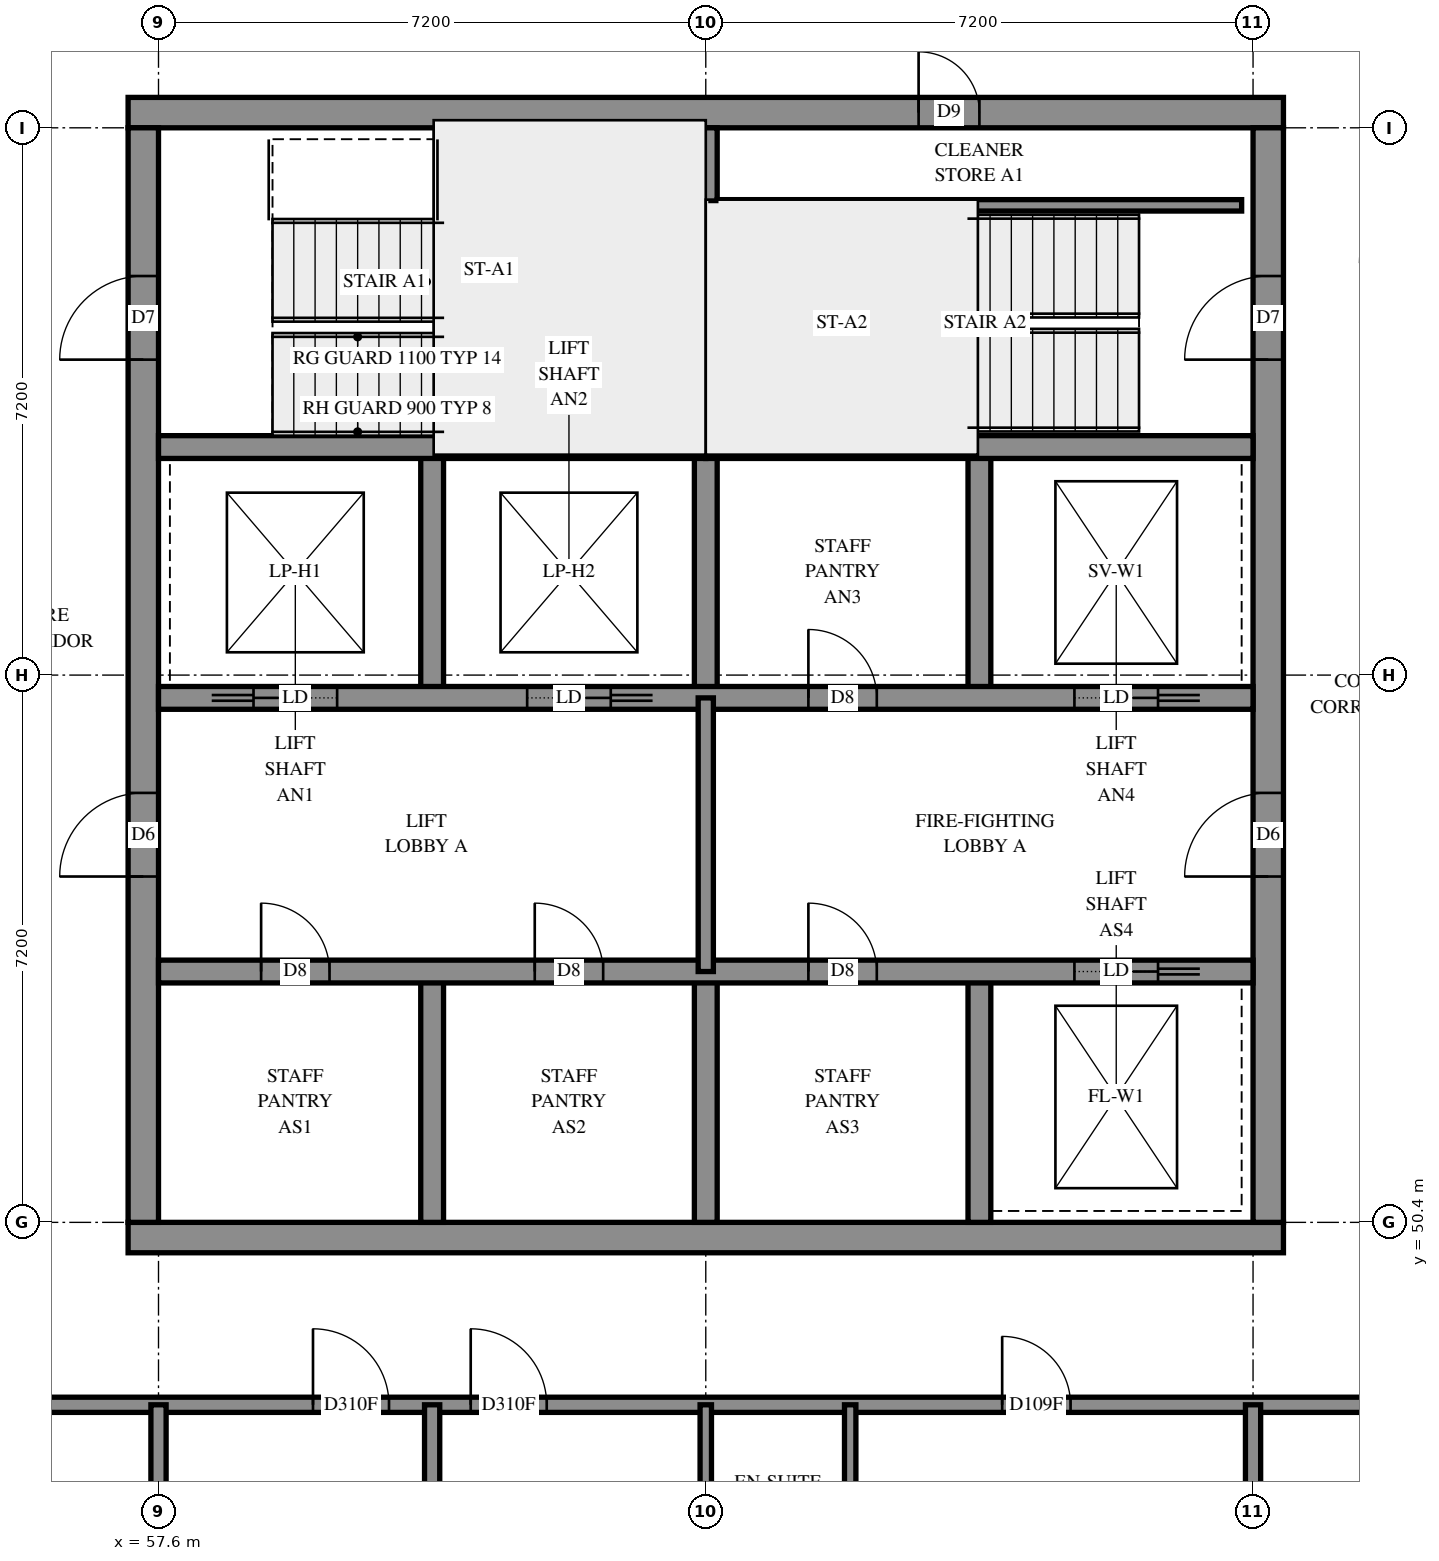
"""IFC4 building model, lengths in metres.
Left out: names, types, materials, properties, quantities, classifications, styles, units other than length and angle.
Written with IfcOpenShell. Run it as: python <this file> out.ifc"""

import sys

from ifc_helpers import new_model, si_unit, direction, frame, frame_2d, origin, place, context, subcontext, project, spatial, rectangle, extrude, element, fill, save


model = new_model("IFC4")
c1 = context("Model", 3, precision=1e-05, world=origin(), true_north=direction((0.0, 1.0)))
c2 = subcontext(c1, "Body", "Model", "MODEL_VIEW")
j1 = project(units=[si_unit("LENGTHUNIT", "METRE"), si_unit("PLANEANGLEUNIT", "RADIAN")], contexts=[c1])
p1 = place(None, origin())
s1 = spatial("IfcSite", under=j1, at=p1, CompositionType="ELEMENT")
p2 = place(p1, origin())
s2 = spatial("IfcBuilding", under=s1, at=p2, CompositionType="ELEMENT")
p3 = place(p2, frame((0.0, 0.0, 271.0)))
s3 = spatial("IfcBuildingStorey", under=s2, at=p3, CompositionType="ELEMENT", Elevation=271.0)
p4 = place(p3, frame((57.2, 50.2, -0.3), z_axis=(0.0, 0.0, 1.0), x_axis=(1.0, 0.0, 0.0)))
e1 = element("IfcWall", 1, at=p4, inside=s3, PredefinedType="SHEAR", context=c2, shape_type="SweptSolid", body=[
    extrude(rectangle(XDim=15.2, YDim=0.4, at=frame_2d((7.6, 0.0))), origin(), (0.0, 0.0, 1.0), 2.7),
])
p5 = place(p3, frame((57.2, 65.0, -0.3), z_axis=(0.0, 0.0, 1.0), x_axis=(1.0, 0.0, 0.0)))
e2 = element("IfcWall", 2, at=p5, inside=s3, PredefinedType="SHEAR", context=c2, shape_type="SweptSolid", body=[
    extrude(rectangle(XDim=15.2, YDim=0.4, at=frame_2d((7.6, 0.0))), origin(), (0.0, 0.0, 1.0), 2.7),
])
p6 = place(p5, frame((10.4, 0.0, 0.3)))
e3 = element("IfcOpeningElement", 3, at=p6, cuts=e2, PredefinedType="OPENING", context=c2, shape_type="SweptSolid", body=[
    extrude(rectangle(XDim=0.8, YDim=2.1, at=frame_2d((0.4, 1.05))), frame((0.0, 0.21, 0.0), z_axis=(0.0, -1.0, 0.0), x_axis=(1.0, 0.0, 0.0)), (0.0, 0.0, 1.0), 0.42),
])
p7 = place(p3, frame((57.4, 50.4, -0.3), z_axis=(0.0, 0.0, 1.0), x_axis=(0.0, 1.0, 0.0)))
e4 = element("IfcWall", 4, at=p7, inside=s3, PredefinedType="SHEAR", context=c2, shape_type="SweptSolid", body=[
    extrude(rectangle(XDim=14.4, YDim=0.4, at=frame_2d((7.2, 0.0))), origin(), (0.0, 0.0, 1.0), 2.7),
])
p8 = place(p7, frame((4.55, 0.0, 0.3)))
e5 = element("IfcOpeningElement", 5, at=p8, cuts=e4, PredefinedType="OPENING", context=c2, shape_type="SweptSolid", body=[
    extrude(rectangle(XDim=1.1, YDim=2.1, at=frame_2d((0.55, 1.05))), frame((0.0, 0.21, 0.0), z_axis=(0.0, -1.0, 0.0), x_axis=(1.0, 0.0, 0.0)), (0.0, 0.0, 1.0), 0.42),
])
p9 = place(p7, frame((11.35, 0.0, 0.3)))
e6 = element("IfcOpeningElement", 6, at=p9, cuts=e4, PredefinedType="OPENING", context=c2, shape_type="SweptSolid", body=[
    extrude(rectangle(XDim=1.1, YDim=2.1, at=frame_2d((0.55, 1.05))), frame((0.0, 0.21, 0.0), z_axis=(0.0, -1.0, 0.0), x_axis=(1.0, 0.0, 0.0)), (0.0, 0.0, 1.0), 0.42),
])
p10 = place(p3, frame((72.2, 50.4, -0.3), z_axis=(0.0, 0.0, 1.0), x_axis=(0.0, 1.0, 0.0)))
e7 = element("IfcWall", 7, at=p10, inside=s3, PredefinedType="SHEAR", context=c2, shape_type="SweptSolid", body=[
    extrude(rectangle(XDim=14.4, YDim=0.4, at=frame_2d((7.2, 0.0))), origin(), (0.0, 0.0, 1.0), 2.7),
])
p11 = place(p10, frame((4.55, 0.0, 0.3)))
e8 = element("IfcOpeningElement", 8, at=p11, cuts=e7, PredefinedType="OPENING", context=c2, shape_type="SweptSolid", body=[
    extrude(rectangle(XDim=1.1, YDim=2.1, at=frame_2d((0.55, 1.05))), frame((0.0, 0.21, 0.0), z_axis=(0.0, -1.0, 0.0), x_axis=(1.0, 0.0, 0.0)), (0.0, 0.0, 1.0), 0.42),
])
p12 = place(p10, frame((11.35, 0.0, 0.3)))
e9 = element("IfcOpeningElement", 9, at=p12, cuts=e7, PredefinedType="OPENING", context=c2, shape_type="SweptSolid", body=[
    extrude(rectangle(XDim=1.1, YDim=2.1, at=frame_2d((0.55, 1.05))), frame((0.0, 0.21, 0.0), z_axis=(0.0, -1.0, 0.0), x_axis=(1.0, 0.0, 0.0)), (0.0, 0.0, 1.0), 0.42),
])
for number, where, z_axis, x_axis in (
    (10, (61.2, 50.4, 0.0), (0.0, 0.0, 1.0), (0.0, 1.0, 0.0)),
    (11, (61.2, 57.3, 0.0), (0.0, 0.0, 1.0), (0.0, 1.0, 0.0)),
    (12, (64.8, 50.4, 0.0), (0.0, 0.0, 1.0), (0.0, 1.0, 0.0)),
    (13, (64.8, 57.3, 0.0), (0.0, 0.0, 1.0), (0.0, 1.0, 0.0)),
    (14, (68.4, 50.4, 0.0), (0.0, 0.0, 1.0), (0.0, 1.0, 0.0)),
    (15, (68.4, 57.3, 0.0), (0.0, 0.0, 1.0), (0.0, 1.0, 0.0)),
):
    element("IfcWall", number, at=place(p3, frame(where, z_axis=z_axis, x_axis=x_axis)), inside=s3, PredefinedType="SOLIDWALL", context=c2, shape_type="SweptSolid", body=[
        extrude(rectangle(XDim=3.3, YDim=0.3, at=frame_2d((1.65, 0.0))), origin(), (0.0, 0.0, 1.0), 3.1),
    ])
p13 = place(p3, frame((57.6, 53.7, 0.0), z_axis=(0.0, 0.0, 1.0), x_axis=(1.0, 0.0, 0.0)))
e16 = element("IfcWall", 16, at=p13, inside=s3, PredefinedType="SOLIDWALL", context=c2, shape_type="SweptSolid", body=[
    extrude(rectangle(XDim=14.4, YDim=0.3, at=frame_2d((7.2, 0.0))), origin(), (0.0, 0.0, 1.0), 3.1),
])
p14 = place(p13, frame((1.35, 0.0, 0.0)))
e17 = element("IfcOpeningElement", 17, at=p14, cuts=e16, PredefinedType="OPENING", context=c2, shape_type="SweptSolid", body=[
    extrude(rectangle(XDim=0.9, YDim=2.1, at=frame_2d((0.45, 1.05))), frame((0.0, 0.16, 0.0), z_axis=(0.0, -1.0, 0.0), x_axis=(1.0, 0.0, 0.0)), (0.0, 0.0, 1.0), 0.32),
])
p15 = place(p13, frame((4.95, 0.0, 0.0)))
e18 = element("IfcOpeningElement", 18, at=p15, cuts=e16, PredefinedType="OPENING", context=c2, shape_type="SweptSolid", body=[
    extrude(rectangle(XDim=0.9, YDim=2.1, at=frame_2d((0.45, 1.05))), frame((0.0, 0.16, 0.0), z_axis=(0.0, -1.0, 0.0), x_axis=(1.0, 0.0, 0.0)), (0.0, 0.0, 1.0), 0.32),
])
p16 = place(p13, frame((8.55, 0.0, 0.0)))
e19 = element("IfcOpeningElement", 19, at=p16, cuts=e16, PredefinedType="OPENING", context=c2, shape_type="SweptSolid", body=[
    extrude(rectangle(XDim=0.9, YDim=2.1, at=frame_2d((0.45, 1.05))), frame((0.0, 0.16, 0.0), z_axis=(0.0, -1.0, 0.0), x_axis=(1.0, 0.0, 0.0)), (0.0, 0.0, 1.0), 0.32),
])
p17 = place(p13, frame((12.05, 0.0, 0.0)))
e20 = element("IfcOpeningElement", 20, at=p17, cuts=e16, PredefinedType="OPENING", context=c2, shape_type="SweptSolid", body=[
    extrude(rectangle(XDim=1.1, YDim=2.1, at=frame_2d((0.55, 1.05))), frame((0.0, 0.16, 0.0), z_axis=(0.0, -1.0, 0.0), x_axis=(1.0, 0.0, 0.0)), (0.0, 0.0, 1.0), 0.32),
])
p18 = place(p3, frame((57.6, 57.3, 0.0), z_axis=(0.0, 0.0, 1.0), x_axis=(1.0, 0.0, 0.0)))
e21 = element("IfcWall", 21, at=p18, inside=s3, PredefinedType="SOLIDWALL", context=c2, shape_type="SweptSolid", body=[
    extrude(rectangle(XDim=14.4, YDim=0.3, at=frame_2d((7.2, 0.0))), origin(), (0.0, 0.0, 1.0), 3.1),
])
p19 = place(p18, frame((8.55, 0.0, 0.0)))
e22 = element("IfcOpeningElement", 22, at=p19, cuts=e21, PredefinedType="OPENING", context=c2, shape_type="SweptSolid", body=[
    extrude(rectangle(XDim=0.9, YDim=2.1, at=frame_2d((0.45, 1.05))), frame((0.0, 0.16, 0.0), z_axis=(0.0, -1.0, 0.0), x_axis=(1.0, 0.0, 0.0)), (0.0, 0.0, 1.0), 0.32),
])
p20 = place(p18, frame((1.25, 0.0, 0.0)))
e23 = element("IfcOpeningElement", 23, at=p20, cuts=e21, PredefinedType="OPENING", context=c2, shape_type="SweptSolid", body=[
    extrude(rectangle(XDim=1.1, YDim=2.1, at=frame_2d((0.55, 1.05))), frame((0.0, 0.16, 0.0), z_axis=(0.0, -1.0, 0.0), x_axis=(1.0, 0.0, 0.0)), (0.0, 0.0, 1.0), 0.32),
])
p21 = place(p18, frame((4.85, 0.0, 0.0)))
e24 = element("IfcOpeningElement", 24, at=p21, cuts=e21, PredefinedType="OPENING", context=c2, shape_type="SweptSolid", body=[
    extrude(rectangle(XDim=1.1, YDim=2.1, at=frame_2d((0.55, 1.05))), frame((0.0, 0.16, 0.0), z_axis=(0.0, -1.0, 0.0), x_axis=(1.0, 0.0, 0.0)), (0.0, 0.0, 1.0), 0.32),
])
p22 = place(p18, frame((12.05, 0.0, 0.0)))
e25 = element("IfcOpeningElement", 25, at=p22, cuts=e21, PredefinedType="OPENING", context=c2, shape_type="SweptSolid", body=[
    extrude(rectangle(XDim=1.1, YDim=2.1, at=frame_2d((0.55, 1.05))), frame((0.0, 0.16, 0.0), z_axis=(0.0, -1.0, 0.0), x_axis=(1.0, 0.0, 0.0)), (0.0, 0.0, 1.0), 0.32),
])
for number, where, z_axis, x_axis in (
    (26, (57.6, 60.6, 0.0), (0.0, 0.0, 1.0), (1.0, 0.0, 0.0)),
    (27, (64.8, 60.6, 0.0), (0.0, 0.0, 1.0), (1.0, 0.0, 0.0)),
):
    element("IfcWall", number, at=place(p3, frame(where, z_axis=z_axis, x_axis=x_axis)), inside=s3, PredefinedType="SOLIDWALL", context=c2, shape_type="SweptSolid", body=[
        extrude(rectangle(XDim=7.2, YDim=0.3, at=frame_2d((3.6, 0.0))), origin(), (0.0, 0.0, 1.0), 3.1),
    ])
p23 = place(p3, frame((64.8, 60.6, 0.0), z_axis=(0.0, 0.0, 1.0), x_axis=(0.0, 1.0, 0.0)))
e28 = element("IfcWall", 28, at=p23, inside=s3, PredefinedType="SOLIDWALL", context=c2, shape_type="SweptSolid", body=[
    extrude(rectangle(XDim=4.2, YDim=0.3, at=frame_2d((2.1, 0.0))), origin(), (0.0, 0.0, 1.0), 3.1),
])
p24 = place(p3, frame((64.95, 63.78, 0.0), z_axis=(0.0, 0.0, 1.0), x_axis=(1.0, 0.0, 0.0)))
e29 = element("IfcWall", 29, at=p24, inside=s3, PredefinedType="PARTITIONING", context=c2, shape_type="SweptSolid", body=[
    extrude(rectangle(XDim=6.9, YDim=0.15, at=frame_2d((3.45, 0.0))), origin(), (0.0, 0.0, 1.0), 3.1),
])
p25 = place(p3, frame((64.8, 53.7, 0.0), z_axis=(0.0, 0.0, 1.0), x_axis=(0.0, 1.0, 0.0)))
e30 = element("IfcWall", 30, at=p25, inside=s3, PredefinedType="PARTITIONING", context=c2, shape_type="SweptSolid", body=[
    extrude(rectangle(XDim=3.6, YDim=0.2, at=frame_2d((1.8, 0.0))), origin(), (0.0, 0.0, 1.0), 3.1),
])
p26 = place(p3, frame((55.2, 48.0, 0.0), z_axis=(0.0, 0.0, 1.0), x_axis=(1.0, 0.0, 0.0)))
e31 = element("IfcWall", 31, at=p26, inside=s3, PredefinedType="PARTITIONING", context=c2, shape_type="SweptSolid", body=[
    extrude(rectangle(XDim=19.15, YDim=0.2, at=frame_2d((9.575, 0.0))), origin(), (0.0, 0.0, 1.0), 3.1),
])
p27 = place(p26, frame((4.433, 0.0, 0.0)))
e32 = element("IfcOpeningElement", 32, at=p27, cuts=e31, PredefinedType="OPENING", context=c2, shape_type="SweptSolid", body=[
    extrude(rectangle(XDim=1.0, YDim=2.1, at=frame_2d((0.5, 1.05))), frame((0.0, 0.11, 0.0), z_axis=(0.0, -1.0, 0.0), x_axis=(1.0, 0.0, 0.0)), (0.0, 0.0, 1.0), 0.22),
])
p28 = place(p26, frame((6.508, 0.0, 0.0)))
e33 = element("IfcOpeningElement", 33, at=p28, cuts=e31, PredefinedType="OPENING", context=c2, shape_type="SweptSolid", body=[
    extrude(rectangle(XDim=1.0, YDim=2.1, at=frame_2d((0.5, 1.05))), frame((0.0, 0.11, 0.0), z_axis=(0.0, -1.0, 0.0), x_axis=(1.0, 0.0, 0.0)), (0.0, 0.0, 1.0), 0.22),
])
p29 = place(p26, frame((13.499, 0.0, 0.0)))
e34 = element("IfcOpeningElement", 34, at=p29, cuts=e31, PredefinedType="OPENING", context=c2, shape_type="SweptSolid", body=[
    extrude(rectangle(XDim=0.9, YDim=2.1, at=frame_2d((0.45, 1.05))), frame((0.0, 0.11, 0.0), z_axis=(0.0, -1.0, 0.0), x_axis=(1.0, 0.0, 0.0)), (0.0, 0.0, 1.0), 0.22),
])
p30 = place(p3, frame((61.2, 42.281, 0.0), z_axis=(0.0, 0.0, 1.0), x_axis=(0.0, 1.0, 0.0)))
e35 = element("IfcWall", 35, at=p30, inside=s3, PredefinedType="PARTITIONING", context=c2, shape_type="SweptSolid", body=[
    extrude(rectangle(XDim=5.72, YDim=0.2, at=frame_2d((2.86, 0.0))), origin(), (0.0, 0.0, 1.0), 3.1),
])
for number, where, z_axis, x_axis in (
    (36, (57.6, 43.55, 0.0), (0.0, 0.0, 1.0), (0.0, 1.0, 0.0)),
    (37, (72.0, 43.55, 0.0), (0.0, 0.0, 1.0), (0.0, 1.0, 0.0)),
):
    element("IfcWall", number, at=place(p3, frame(where, z_axis=z_axis, x_axis=x_axis)), inside=s3, PredefinedType="PARTITIONING", context=c2, shape_type="SweptSolid", body=[
        extrude(rectangle(XDim=4.45, YDim=0.2, at=frame_2d((2.225, 0.0))), origin(), (0.0, 0.0, 1.0), 3.1),
    ])
for number, where, z_axis, x_axis in (
    (38, (66.7, 45.6, 0.0), (0.0, 0.0, 1.0), (0.0, 1.0, 0.0)),
    (39, (64.8, 45.6, 0.0), (0.0, 0.0, 1.0), (0.0, 1.0, 0.0)),
):
    element("IfcWall", number, at=place(p3, frame(where, z_axis=z_axis, x_axis=x_axis)), inside=s3, PredefinedType="PARTITIONING", context=c2, shape_type="SweptSolid", body=[
        extrude(rectangle(XDim=2.4, YDim=0.15, at=frame_2d((1.2, 0.0))), origin(), (0.0, 0.0, 1.0), 3.1),
    ])
p31 = place(p6, origin())
e40 = element("IfcDoor", 40, at=p31, inside=s3, OperationType="SINGLE_SWING_RIGHT", PredefinedType="DOOR", context=c2, shape_type="SweptSolid", body=[
    extrude(rectangle(XDim=0.8, YDim=2.1, at=frame_2d((0.4, 1.05))), frame((0.0, 0.025, 0.0), z_axis=(0.0, -1.0, 0.0), x_axis=(1.0, 0.0, 0.0)), (0.0, 0.0, 1.0), 0.05),
])
fill(e3, e40)
p32 = place(p8, origin())
e41 = element("IfcDoor", 41, at=p32, inside=s3, OperationType="DOUBLE_DOOR_SINGLE_SWING", PredefinedType="DOOR", context=c2, shape_type="SweptSolid", body=[
    extrude(rectangle(XDim=1.1, YDim=2.1, at=frame_2d((0.55, 1.05))), frame((0.0, 0.025, 0.0), z_axis=(0.0, -1.0, 0.0), x_axis=(1.0, 0.0, 0.0)), (0.0, 0.0, 1.0), 0.05),
])
fill(e5, e41)
p33 = place(p11, origin())
e42 = element("IfcDoor", 42, at=p33, inside=s3, OperationType="DOUBLE_DOOR_SINGLE_SWING", PredefinedType="DOOR", context=c2, shape_type="SweptSolid", body=[
    extrude(rectangle(XDim=1.1, YDim=2.1, at=frame_2d((0.55, 1.05))), frame((0.0, 0.025, 0.0), z_axis=(0.0, -1.0, 0.0), x_axis=(1.0, 0.0, 0.0)), (0.0, 0.0, 1.0), 0.05),
])
fill(e8, e42)
p34 = place(p9, origin())
e43 = element("IfcDoor", 43, at=p34, inside=s3, OperationType="SINGLE_SWING_LEFT", PredefinedType="DOOR", context=c2, shape_type="SweptSolid", body=[
    extrude(rectangle(XDim=1.1, YDim=2.1, at=frame_2d((0.55, 1.05))), frame((0.0, 0.025, 0.0), z_axis=(0.0, -1.0, 0.0), x_axis=(1.0, 0.0, 0.0)), (0.0, 0.0, 1.0), 0.05),
])
fill(e6, e43)
p35 = place(p12, origin())
e44 = element("IfcDoor", 44, at=p35, inside=s3, OperationType="SINGLE_SWING_RIGHT", PredefinedType="DOOR", context=c2, shape_type="SweptSolid", body=[
    extrude(rectangle(XDim=1.1, YDim=2.1, at=frame_2d((0.55, 1.05))), frame((0.0, 0.025, 0.0), z_axis=(0.0, -1.0, 0.0), x_axis=(1.0, 0.0, 0.0)), (0.0, 0.0, 1.0), 0.05),
])
fill(e9, e44)
p36 = place(p14, origin())
e45 = element("IfcDoor", 45, at=p36, inside=s3, OperationType="SINGLE_SWING_LEFT", PredefinedType="DOOR", context=c2, shape_type="SweptSolid", body=[
    extrude(rectangle(XDim=0.9, YDim=2.1, at=frame_2d((0.45, 1.05))), frame((0.0, 0.025, 0.0), z_axis=(0.0, -1.0, 0.0), x_axis=(1.0, 0.0, 0.0)), (0.0, 0.0, 1.0), 0.05),
])
fill(e17, e45)
p37 = place(p15, origin())
e46 = element("IfcDoor", 46, at=p37, inside=s3, OperationType="SINGLE_SWING_LEFT", PredefinedType="DOOR", context=c2, shape_type="SweptSolid", body=[
    extrude(rectangle(XDim=0.9, YDim=2.1, at=frame_2d((0.45, 1.05))), frame((0.0, 0.025, 0.0), z_axis=(0.0, -1.0, 0.0), x_axis=(1.0, 0.0, 0.0)), (0.0, 0.0, 1.0), 0.05),
])
fill(e18, e46)
p38 = place(p16, origin())
e47 = element("IfcDoor", 47, at=p38, inside=s3, OperationType="SINGLE_SWING_LEFT", PredefinedType="DOOR", context=c2, shape_type="SweptSolid", body=[
    extrude(rectangle(XDim=0.9, YDim=2.1, at=frame_2d((0.45, 1.05))), frame((0.0, 0.025, 0.0), z_axis=(0.0, -1.0, 0.0), x_axis=(1.0, 0.0, 0.0)), (0.0, 0.0, 1.0), 0.05),
])
fill(e19, e47)
p39 = place(p19, origin())
e48 = element("IfcDoor", 48, at=p39, inside=s3, OperationType="SINGLE_SWING_LEFT", PredefinedType="DOOR", context=c2, shape_type="SweptSolid", body=[
    extrude(rectangle(XDim=0.9, YDim=2.1, at=frame_2d((0.45, 1.05))), frame((0.0, 0.025, 0.0), z_axis=(0.0, -1.0, 0.0), x_axis=(1.0, 0.0, 0.0)), (0.0, 0.0, 1.0), 0.05),
])
fill(e22, e48)
p40 = place(p17, origin())
e49 = element("IfcDoor", 49, at=p40, inside=s3, OperationType="SLIDING_TO_RIGHT", PredefinedType="DOOR", context=c2, shape_type="SweptSolid", body=[
    extrude(rectangle(XDim=1.1, YDim=2.1, at=frame_2d((0.55, 1.05))), frame((0.0, 0.025, 0.0), z_axis=(0.0, -1.0, 0.0), x_axis=(1.0, 0.0, 0.0)), (0.0, 0.0, 1.0), 0.05),
])
fill(e20, e49)
p41 = place(p20, origin())
e50 = element("IfcDoor", 50, at=p41, inside=s3, OperationType="SLIDING_TO_LEFT", PredefinedType="DOOR", context=c2, shape_type="SweptSolid", body=[
    extrude(rectangle(XDim=1.1, YDim=2.1, at=frame_2d((0.55, 1.05))), frame((0.0, 0.025, 0.0), z_axis=(0.0, -1.0, 0.0), x_axis=(1.0, 0.0, 0.0)), (0.0, 0.0, 1.0), 0.05),
])
fill(e23, e50)
p42 = place(p21, origin())
e51 = element("IfcDoor", 51, at=p42, inside=s3, OperationType="SLIDING_TO_RIGHT", PredefinedType="DOOR", context=c2, shape_type="SweptSolid", body=[
    extrude(rectangle(XDim=1.1, YDim=2.1, at=frame_2d((0.55, 1.05))), frame((0.0, 0.025, 0.0), z_axis=(0.0, -1.0, 0.0), x_axis=(1.0, 0.0, 0.0)), (0.0, 0.0, 1.0), 0.05),
])
fill(e24, e51)
p43 = place(p22, origin())
e52 = element("IfcDoor", 52, at=p43, inside=s3, OperationType="SLIDING_TO_RIGHT", PredefinedType="DOOR", context=c2, shape_type="SweptSolid", body=[
    extrude(rectangle(XDim=1.1, YDim=2.1, at=frame_2d((0.55, 1.05))), frame((0.0, 0.025, 0.0), z_axis=(0.0, -1.0, 0.0), x_axis=(1.0, 0.0, 0.0)), (0.0, 0.0, 1.0), 0.05),
])
fill(e25, e52)
p44 = place(p27, origin())
e53 = element("IfcDoor", 53, at=p44, inside=s3, OperationType="SINGLE_SWING_LEFT", PredefinedType="DOOR", context=c2, shape_type="SweptSolid", body=[
    extrude(rectangle(XDim=1.0, YDim=2.1, at=frame_2d((0.5, 1.05))), frame((0.0, 0.025, 0.0), z_axis=(0.0, -1.0, 0.0), x_axis=(1.0, 0.0, 0.0)), (0.0, 0.0, 1.0), 0.05),
])
fill(e32, e53)
p45 = place(p28, origin())
e54 = element("IfcDoor", 54, at=p45, inside=s3, OperationType="SINGLE_SWING_RIGHT", PredefinedType="DOOR", context=c2, shape_type="SweptSolid", body=[
    extrude(rectangle(XDim=1.0, YDim=2.1, at=frame_2d((0.5, 1.05))), frame((0.0, 0.025, 0.0), z_axis=(0.0, -1.0, 0.0), x_axis=(1.0, 0.0, 0.0)), (0.0, 0.0, 1.0), 0.05),
])
fill(e33, e54)
p46 = place(p29, origin())
e55 = element("IfcDoor", 55, at=p46, inside=s3, OperationType="SINGLE_SWING_LEFT", PredefinedType="DOOR", context=c2, shape_type="SweptSolid", body=[
    extrude(rectangle(XDim=0.9, YDim=2.1, at=frame_2d((0.45, 1.05))), frame((0.0, 0.025, 0.0), z_axis=(0.0, -1.0, 0.0), x_axis=(1.0, 0.0, 0.0)), (0.0, 0.0, 1.0), 0.05),
])
fill(e34, e55)
save(model, sys.argv[1])
